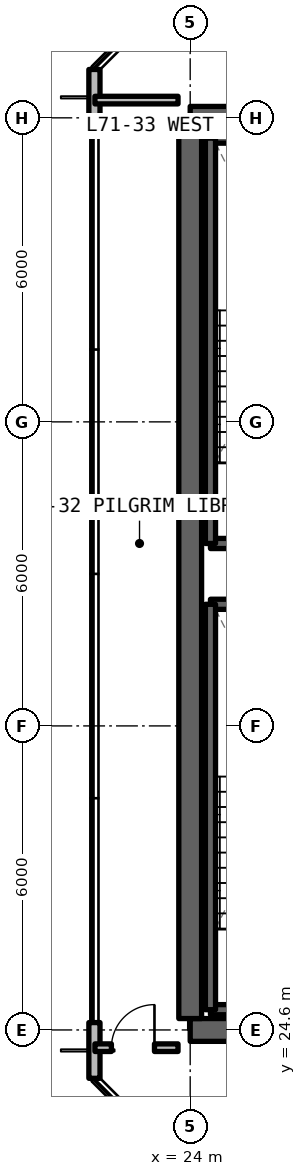
"""IFC4 building model, lengths in metres.
Left out: names, types, materials, properties, quantities, classifications, styles, units other than length and angle.
Written with IfcOpenShell. Run it as: python <this file> out.ifc"""

import sys

from ifc_helpers import new_model, si_unit, direction, frame, frame_2d, origin, place, context, subcontext, project, spatial, rectangle, extrude, element, fill, save


model = new_model("IFC4")
c1 = context("Model", 3, precision=1e-05, world=origin(), true_north=direction((0.0, 1.0)))
c2 = subcontext(c1, "Body", "Model", "MODEL_VIEW")
j1 = project(units=[si_unit("LENGTHUNIT", "METRE"), si_unit("PLANEANGLEUNIT", "RADIAN")], contexts=[c1])
p1 = place(None, origin())
s1 = spatial("IfcSite", under=j1, at=p1, CompositionType="ELEMENT")
p2 = place(p1, origin())
s2 = spatial("IfcBuilding", under=s1, at=p2, CompositionType="ELEMENT")
p3 = place(p2, frame((0.0, 0.0, 253.44)))
s3 = spatial("IfcBuildingStorey", under=s2, at=p3, CompositionType="ELEMENT", Elevation=253.44)
p4 = place(p3, frame((24.0, 24.6, 0.0), z_axis=(0.0, 0.0, 1.0), x_axis=(1.0, 0.0, 0.0)))
e1 = element("IfcWall", 1, at=p4, inside=s3, PredefinedType="SHEAR", context=c2, shape_type="SweptSolid", body=[
    extrude(rectangle(XDim=12.0, YDim=0.45, at=frame_2d((6.0, 0.0))), origin(), (0.0, 0.0, 1.0), 3.63),
])
p5 = place(p4, frame((7.2, 0.0, 0.0)))
e2 = element("IfcOpeningElement", 2, at=p5, cuts=e1, PredefinedType="OPENING", context=c2, shape_type="SweptSolid", body=[
    extrude(rectangle(XDim=1.0, YDim=2.15, at=frame_2d((0.5, 1.075))), frame((0.0, 0.235, 0.0), z_axis=(0.0, -1.0, 0.0), x_axis=(1.0, 0.0, 0.0)), (0.0, 0.0, 1.0), 0.47),
])
p6 = place(p3, frame((36.0, 42.6, 0.0), z_axis=(0.0, 0.0, 1.0), x_axis=(-1.0, 0.0, 0.0)))
e3 = element("IfcWall", 3, at=p6, inside=s3, PredefinedType="SHEAR", context=c2, shape_type="SweptSolid", body=[
    extrude(rectangle(XDim=12.0, YDim=0.45, at=frame_2d((6.0, 0.0))), origin(), (0.0, 0.0, 1.0), 3.63),
])
p7 = place(p6, frame((3.8, 0.0, 0.0)))
e4 = element("IfcOpeningElement", 4, at=p7, cuts=e3, PredefinedType="OPENING", context=c2, shape_type="SweptSolid", body=[
    extrude(rectangle(XDim=1.0, YDim=2.15, at=frame_2d((0.5, 1.075))), frame((0.0, 0.235, 0.0), z_axis=(0.0, -1.0, 0.0), x_axis=(1.0, 0.0, 0.0)), (0.0, 0.0, 1.0), 0.47),
])
p8 = place(p3, frame((24.0, 24.825, 0.0), z_axis=(0.0, 0.0, 1.0), x_axis=(0.0, 1.0, 0.0)))
e5 = element("IfcWall", 5, at=p8, inside=s3, PredefinedType="SHEAR", context=c2, shape_type="SweptSolid", body=[
    extrude(rectangle(XDim=17.55, YDim=0.45, at=frame_2d((8.775, 0.0))), origin(), (0.0, 0.0, 1.0), 3.63),
])
for number, where, z_axis, x_axis in (
    (6, (22.11, 43.554, 0.0), (0.0, 0.0, 1.0), (0.0, -1.0, 0.0)),
    (7, (22.11, 24.746, 0.0), (0.0, 0.0, 1.0), (0.0, -1.0, 0.0)),
):
    element("IfcWall", number, at=place(p3, frame(where, z_axis=z_axis, x_axis=x_axis)), inside=s3, PredefinedType="SOLIDWALL", context=c2, shape_type="SweptSolid", body=[
        extrude(rectangle(XDim=1.1, YDim=0.22, at=frame_2d((0.55, 0.0))), origin(), (0.0, 0.0, 1.0), 3.41),
    ])
p9 = place(p3, frame((22.12, 24.25, 0.0), z_axis=(0.0, 0.0, 1.0), x_axis=(1.0, 0.0, 0.0)))
e8 = element("IfcWall", 8, at=p9, inside=s3, PredefinedType="SOLIDWALL", context=c2, shape_type="SweptSolid", body=[
    extrude(rectangle(XDim=1.64, YDim=0.15, at=frame_2d((0.82, 0.0))), origin(), (0.0, 0.0, 1.0), 2.63),
])
p10 = place(p9, frame((0.325, 0.0, 0.0)))
e9 = element("IfcOpeningElement", 9, at=p10, cuts=e8, PredefinedType="OPENING", context=c2, shape_type="SweptSolid", body=[
    extrude(rectangle(XDim=0.85, YDim=2.1, at=frame_2d((0.425, 1.05))), frame((0.0, 0.085, 0.0), z_axis=(0.0, -1.0, 0.0), x_axis=(1.0, 0.0, 0.0)), (0.0, 0.0, 1.0), 0.17),
])
p11 = place(p3, frame((22.12, 42.95, 0.0), z_axis=(0.0, 0.0, 1.0), x_axis=(1.0, 0.0, 0.0)))
e10 = element("IfcWall", 10, at=p11, inside=s3, PredefinedType="SOLIDWALL", context=c2, shape_type="SweptSolid", body=[
    extrude(rectangle(XDim=1.64, YDim=0.15, at=frame_2d((0.82, 0.0))), origin(), (0.0, 0.0, 1.0), 2.63),
])
for number, where, z_axis, x_axis in (
    (11, (24.4, 25.0, 0.0), (0.0, 0.0, 1.0), (1.0, 0.0, 0.0)),
    (12, (27.8, 33.0, 0.0), (0.0, 0.0, 1.0), (-1.0, 0.0, 0.0)),
):
    element("IfcWall", number, at=place(p3, frame(where, z_axis=z_axis, x_axis=x_axis)), inside=s3, PredefinedType="SOLIDWALL", context=c2, shape_type="SweptSolid", body=[
        extrude(rectangle(XDim=3.4, YDim=0.2, at=frame_2d((1.7, 0.0))), origin(), (0.0, 0.0, 1.0), 3.63),
    ])
p12 = place(p3, frame((24.4, 33.0, 0.0), z_axis=(0.0, 0.0, 1.0), x_axis=(0.0, -1.0, 0.0)))
e13 = element("IfcWall", 13, at=p12, inside=s3, PredefinedType="SOLIDWALL", context=c2, shape_type="SweptSolid", body=[
    extrude(rectangle(XDim=8.0, YDim=0.2, at=frame_2d((4.0, 0.0))), origin(), (0.0, 0.0, 1.0), 3.63),
])
for number, where, z_axis, x_axis in (
    (14, (24.4, 34.2, 0.0), (0.0, 0.0, 1.0), (1.0, 0.0, 0.0)),
    (15, (27.8, 42.2, 0.0), (0.0, 0.0, 1.0), (-1.0, 0.0, 0.0)),
):
    element("IfcWall", number, at=place(p3, frame(where, z_axis=z_axis, x_axis=x_axis)), inside=s3, PredefinedType="SOLIDWALL", context=c2, shape_type="SweptSolid", body=[
        extrude(rectangle(XDim=3.4, YDim=0.2, at=frame_2d((1.7, 0.0))), origin(), (0.0, 0.0, 1.0), 3.63),
    ])
p13 = place(p3, frame((24.4, 42.2, 0.0), z_axis=(0.0, 0.0, 1.0), x_axis=(0.0, -1.0, 0.0)))
e16 = element("IfcWall", 16, at=p13, inside=s3, PredefinedType="SOLIDWALL", context=c2, shape_type="SweptSolid", body=[
    extrude(rectangle(XDim=8.0, YDim=0.2, at=frame_2d((4.0, 0.0))), origin(), (0.0, 0.0, 1.0), 3.63),
])
p14 = place(p10, origin())
e17 = element("IfcDoor", 17, at=p14, inside=s3, OperationType="SINGLE_SWING_RIGHT", PredefinedType="DOOR", context=c2, shape_type="SweptSolid", body=[
    extrude(rectangle(XDim=0.85, YDim=2.1, at=frame_2d((0.425, 1.05))), frame((0.0, 0.025, 0.0), z_axis=(0.0, -1.0, 0.0), x_axis=(1.0, 0.0, 0.0)), (0.0, 0.0, 1.0), 0.05),
])
fill(e9, e17)
save(model, sys.argv[1])
